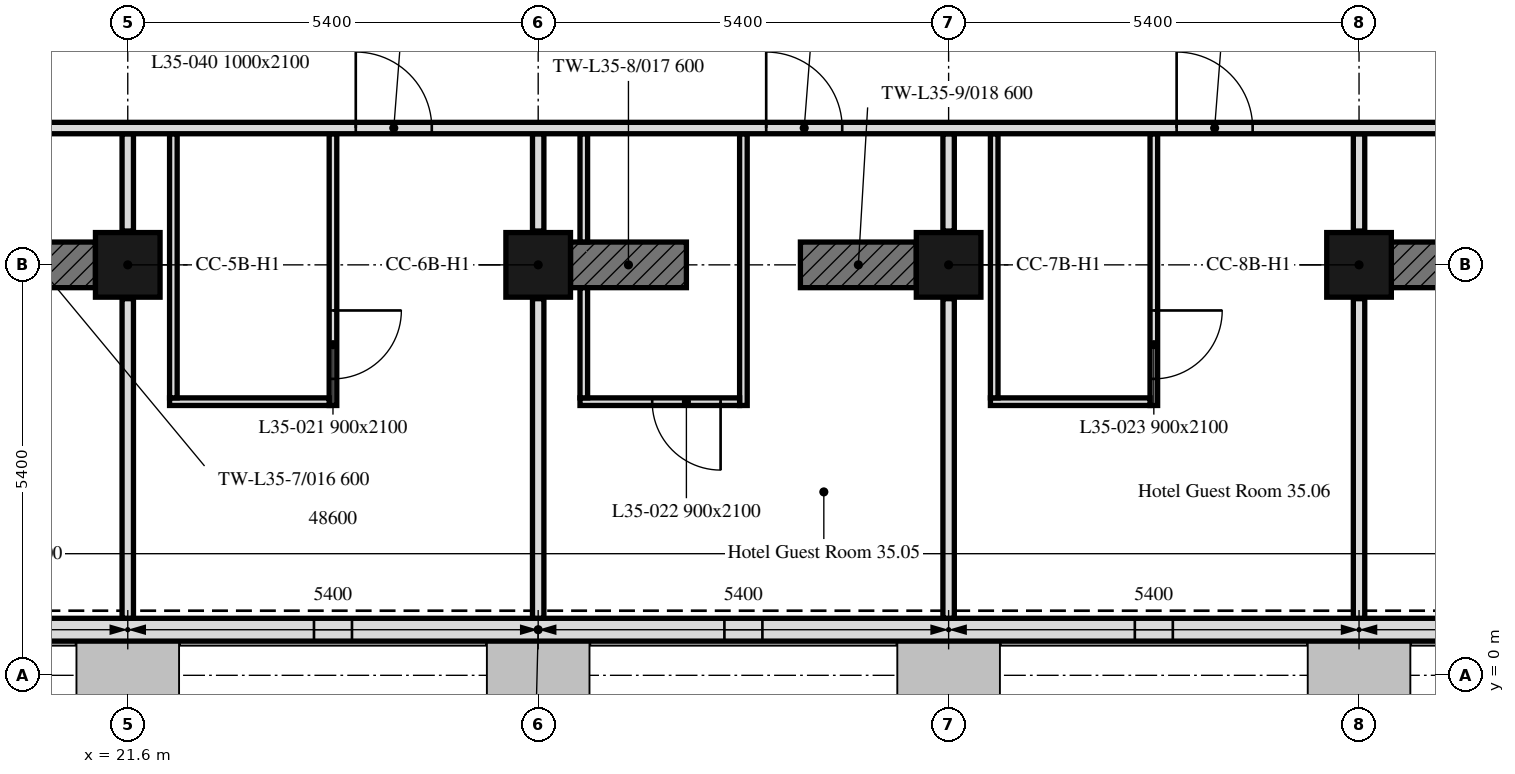
"""IFC4 building model, lengths in metres.
Left out: names, types, materials, properties, quantities, classifications, styles, units other than length and angle.
Written with IfcOpenShell. Run it as: python <this file> out.ifc"""

import sys

from ifc_helpers import new_model, si_unit, direction, frame, frame_2d, origin, origin_2d, place, context, subcontext, project, spatial, rectangle, extrude, element, fill, save


model = new_model("IFC4")
c1 = context("Model", 3, precision=1e-05, world=origin(), true_north=direction((0.0, 1.0)))
c2 = subcontext(c1, "Body", "Model", "MODEL_VIEW")
j1 = project(units=[si_unit("LENGTHUNIT", "METRE"), si_unit("PLANEANGLEUNIT", "RADIAN")], contexts=[c1])
p1 = place(None, origin())
s1 = spatial("IfcSite", under=j1, at=p1, CompositionType="ELEMENT")
p2 = place(p1, origin())
s2 = spatial("IfcBuilding", under=s1, at=p2, CompositionType="ELEMENT")
p3 = place(p2, frame((0.0, 0.0, 152.8)))
s3 = spatial("IfcBuildingStorey", under=s2, at=p3, CompositionType="ELEMENT", Elevation=152.8)
for number, where, z_axis, x_axis in (
    (1, (21.6, 5.4, 0.0), (0.0, 0.0, 1.0), (1.0, 0.0, 0.0)),
    (2, (27.0, 5.4, 0.0), (0.0, 0.0, 1.0), (1.0, 0.0, 0.0)),
    (3, (32.4, 5.4, 0.0), (0.0, 0.0, 1.0), (1.0, 0.0, 0.0)),
    (4, (37.8, 5.4, 0.0), (0.0, 0.0, 1.0), (1.0, 0.0, 0.0)),
):
    element("IfcColumn", number, at=place(p3, frame(where, z_axis=z_axis, x_axis=x_axis)), inside=s3, PredefinedType="COLUMN", context=c2, shape_type="SweptSolid", body=[
        extrude(rectangle(XDim=0.85, YDim=0.85, at=origin_2d()), origin(), (0.0, 0.0, 1.0), 3.0),
    ])
p4 = place(p3, frame((19.65, 5.4, 0.0), z_axis=(0.0, 0.0, 1.0), x_axis=(1.0, 0.0, 0.0)))
e5 = element("IfcWall", 5, at=p4, inside=s3, PredefinedType="SHEAR", context=c2, shape_type="SweptSolid", body=[
    extrude(rectangle(XDim=1.525, YDim=0.6, at=frame_2d((0.763, 0.0))), origin(), (0.0, 0.0, 1.0), 3.0),
])
p5 = place(p3, frame((27.425, 5.4, 0.0), z_axis=(0.0, 0.0, 1.0), x_axis=(1.0, 0.0, 0.0)))
e6 = element("IfcWall", 6, at=p5, inside=s3, PredefinedType="SHEAR", context=c2, shape_type="SweptSolid", body=[
    extrude(rectangle(XDim=1.525, YDim=0.6, at=frame_2d((0.762, 0.0))), origin(), (0.0, 0.0, 1.0), 3.0),
])
p6 = place(p3, frame((30.45, 5.4, 0.0), z_axis=(0.0, 0.0, 1.0), x_axis=(1.0, 0.0, 0.0)))
e7 = element("IfcWall", 7, at=p6, inside=s3, PredefinedType="SHEAR", context=c2, shape_type="SweptSolid", body=[
    extrude(rectangle(XDim=1.525, YDim=0.6, at=frame_2d((0.763, 0.0))), origin(), (0.0, 0.0, 1.0), 3.0),
])
p7 = place(p3, frame((38.225, 5.4, 0.0), z_axis=(0.0, 0.0, 1.0), x_axis=(1.0, 0.0, 0.0)))
e8 = element("IfcWall", 8, at=p7, inside=s3, PredefinedType="SHEAR", context=c2, shape_type="SweptSolid", body=[
    extrude(rectangle(XDim=1.737, YDim=0.6, at=frame_2d((0.869, 0.0))), origin(), (0.0, 0.0, 1.0), 3.0),
])
p8 = place(p3, frame((10.986, 0.6, 0.0), z_axis=(0.0, 0.0, 1.0), x_axis=(1.0, 0.0, 0.0)))
e9 = element("IfcWall", 9, at=p8, inside=s3, PredefinedType="SOLIDWALL", context=c2, shape_type="SweptSolid", body=[
    extrude(rectangle(XDim=32.027, YDim=0.3, at=frame_2d((16.014, 0.0))), origin(), (0.0, 0.0, 1.0), 3.0),
])
p9 = place(p8, frame((0.814, 0.0, 0.9)))
e10 = element("IfcOpeningElement", 10, at=p9, cuts=e9, PredefinedType="OPENING", context=c2, shape_type="SweptSolid", body=[
    extrude(rectangle(XDim=3.4, YDim=1.7, at=frame_2d((1.7, 0.85))), frame((0.0, 0.16, 0.0), z_axis=(0.0, -1.0, 0.0), x_axis=(1.0, 0.0, 0.0)), (0.0, 0.0, 1.0), 0.32),
])
p10 = place(p8, frame((7.664, 0.0, 0.9)))
e11 = element("IfcOpeningElement", 11, at=p10, cuts=e9, PredefinedType="OPENING", context=c2, shape_type="SweptSolid", body=[
    extrude(rectangle(XDim=0.5, YDim=1.7, at=frame_2d((0.25, 0.85))), frame((0.0, 0.16, 0.0), z_axis=(0.0, -1.0, 0.0), x_axis=(1.0, 0.0, 0.0)), (0.0, 0.0, 1.0), 0.32),
])
p11 = place(p8, frame((13.064, 0.0, 0.9)))
e12 = element("IfcOpeningElement", 12, at=p11, cuts=e9, PredefinedType="OPENING", context=c2, shape_type="SweptSolid", body=[
    extrude(rectangle(XDim=0.5, YDim=1.7, at=frame_2d((0.25, 0.85))), frame((0.0, 0.16, 0.0), z_axis=(0.0, -1.0, 0.0), x_axis=(1.0, 0.0, 0.0)), (0.0, 0.0, 1.0), 0.32),
])
p12 = place(p8, frame((18.464, 0.0, 0.9)))
e13 = element("IfcOpeningElement", 13, at=p12, cuts=e9, PredefinedType="OPENING", context=c2, shape_type="SweptSolid", body=[
    extrude(rectangle(XDim=0.5, YDim=1.7, at=frame_2d((0.25, 0.85))), frame((0.0, 0.16, 0.0), z_axis=(0.0, -1.0, 0.0), x_axis=(1.0, 0.0, 0.0)), (0.0, 0.0, 1.0), 0.32),
])
p13 = place(p8, frame((23.864, 0.0, 0.9)))
e14 = element("IfcOpeningElement", 14, at=p13, cuts=e9, PredefinedType="OPENING", context=c2, shape_type="SweptSolid", body=[
    extrude(rectangle(XDim=0.5, YDim=1.7, at=frame_2d((0.25, 0.85))), frame((0.0, 0.16, 0.0), z_axis=(0.0, -1.0, 0.0), x_axis=(1.0, 0.0, 0.0)), (0.0, 0.0, 1.0), 0.32),
])
p14 = place(p8, frame((28.164, 0.0, 0.9)))
e15 = element("IfcOpeningElement", 15, at=p14, cuts=e9, PredefinedType="OPENING", context=c2, shape_type="SweptSolid", body=[
    extrude(rectangle(XDim=1.1, YDim=1.7, at=frame_2d((0.55, 0.85))), frame((0.0, 0.16, 0.0), z_axis=(0.0, -1.0, 0.0), x_axis=(1.0, 0.0, 0.0)), (0.0, 0.0, 1.0), 0.32),
])
p15 = place(p3, frame((21.6, 0.751, 0.0), z_axis=(0.0, 0.0, 1.0), x_axis=(0.0, 1.0, 0.0)))
e16 = element("IfcWall", 16, at=p15, inside=s3, PredefinedType="PARTITIONING", context=c2, shape_type="SweptSolid", body=[
    extrude(rectangle(XDim=4.204, YDim=0.15, at=frame_2d((2.102, 0.0))), origin(), (0.0, 0.0, 1.0), 2.4),
])
p16 = place(p3, frame((21.6, 5.845, 0.0), z_axis=(0.0, 0.0, 1.0), x_axis=(0.0, 1.0, 0.0)))
e17 = element("IfcWall", 17, at=p16, inside=s3, PredefinedType="PARTITIONING", context=c2, shape_type="SweptSolid", body=[
    extrude(rectangle(XDim=1.28, YDim=0.15, at=frame_2d((0.64, 0.0))), origin(), (0.0, 0.0, 1.0), 2.4),
])
p17 = place(p3, frame((27.0, 0.751, 0.0), z_axis=(0.0, 0.0, 1.0), x_axis=(0.0, 1.0, 0.0)))
e18 = element("IfcWall", 18, at=p17, inside=s3, PredefinedType="PARTITIONING", context=c2, shape_type="SweptSolid", body=[
    extrude(rectangle(XDim=4.204, YDim=0.15, at=frame_2d((2.102, 0.0))), origin(), (0.0, 0.0, 1.0), 2.4),
])
p18 = place(p3, frame((27.0, 5.845, 0.0), z_axis=(0.0, 0.0, 1.0), x_axis=(0.0, 1.0, 0.0)))
e19 = element("IfcWall", 19, at=p18, inside=s3, PredefinedType="PARTITIONING", context=c2, shape_type="SweptSolid", body=[
    extrude(rectangle(XDim=1.28, YDim=0.15, at=frame_2d((0.64, 0.0))), origin(), (0.0, 0.0, 1.0), 2.4),
])
p19 = place(p3, frame((24.3, 7.125, 0.0), z_axis=(0.0, 0.0, 1.0), x_axis=(0.0, -1.0, 0.0)))
e20 = element("IfcWall", 20, at=p19, inside=s3, PredefinedType="PARTITIONING", context=c2, shape_type="SweptSolid", body=[
    extrude(rectangle(XDim=3.575, YDim=0.1, at=frame_2d((1.788, 0.0))), origin(), (0.0, 0.0, 1.0), 3.0),
])
p20 = place(p19, frame((2.325, 0.0, 0.0)))
e21 = element("IfcOpeningElement", 21, at=p20, cuts=e20, PredefinedType="OPENING", context=c2, shape_type="SweptSolid", body=[
    extrude(rectangle(XDim=0.9, YDim=2.1, at=frame_2d((0.45, 1.05))), frame((0.0, 0.05, 0.0), z_axis=(0.0, -1.0, 0.0), x_axis=(1.0, 0.0, 0.0)), (0.0, 0.0, 1.0), 0.1),
])
p21 = place(p3, frame((24.25, 3.6, 0.0), z_axis=(0.0, 0.0, 1.0), x_axis=(-1.0, 0.0, 0.0)))
e22 = element("IfcWall", 22, at=p21, inside=s3, PredefinedType="PARTITIONING", context=c2, shape_type="SweptSolid", body=[
    extrude(rectangle(XDim=2.1, YDim=0.1, at=frame_2d((1.05, 0.0))), origin(), (0.0, 0.0, 1.0), 3.0),
])
p22 = place(p3, frame((22.2, 3.65, 0.0), z_axis=(0.0, 0.0, 1.0), x_axis=(0.0, 1.0, 0.0)))
e23 = element("IfcWall", 23, at=p22, inside=s3, PredefinedType="PARTITIONING", context=c2, shape_type="SweptSolid", body=[
    extrude(rectangle(XDim=3.475, YDim=0.1, at=frame_2d((1.738, 0.0))), origin(), (0.0, 0.0, 1.0), 3.0),
])
p23 = place(p3, frame((32.4, 0.751, 0.0), z_axis=(0.0, 0.0, 1.0), x_axis=(0.0, 1.0, 0.0)))
e24 = element("IfcWall", 24, at=p23, inside=s3, PredefinedType="PARTITIONING", context=c2, shape_type="SweptSolid", body=[
    extrude(rectangle(XDim=4.204, YDim=0.15, at=frame_2d((2.102, 0.0))), origin(), (0.0, 0.0, 1.0), 2.4),
])
p24 = place(p3, frame((32.4, 5.845, 0.0), z_axis=(0.0, 0.0, 1.0), x_axis=(0.0, 1.0, 0.0)))
e25 = element("IfcWall", 25, at=p24, inside=s3, PredefinedType="PARTITIONING", context=c2, shape_type="SweptSolid", body=[
    extrude(rectangle(XDim=1.28, YDim=0.15, at=frame_2d((0.64, 0.0))), origin(), (0.0, 0.0, 1.0), 2.4),
])
p25 = place(p3, frame((29.7, 7.125, 0.0), z_axis=(0.0, 0.0, 1.0), x_axis=(0.0, -1.0, 0.0)))
e26 = element("IfcWall", 26, at=p25, inside=s3, PredefinedType="PARTITIONING", context=c2, shape_type="SweptSolid", body=[
    extrude(rectangle(XDim=3.575, YDim=0.1, at=frame_2d((1.788, 0.0))), origin(), (0.0, 0.0, 1.0), 3.0),
])
p26 = place(p3, frame((29.65, 3.6, 0.0), z_axis=(0.0, 0.0, 1.0), x_axis=(-1.0, 0.0, 0.0)))
e27 = element("IfcWall", 27, at=p26, inside=s3, PredefinedType="PARTITIONING", context=c2, shape_type="SweptSolid", body=[
    extrude(rectangle(XDim=2.1, YDim=0.1, at=frame_2d((1.05, 0.0))), origin(), (0.0, 0.0, 1.0), 3.0),
])
p27 = place(p26, frame((0.25, 0.0, 0.0)))
e28 = element("IfcOpeningElement", 28, at=p27, cuts=e27, PredefinedType="OPENING", context=c2, shape_type="SweptSolid", body=[
    extrude(rectangle(XDim=0.9, YDim=2.1, at=frame_2d((0.45, 1.05))), frame((0.0, 0.05, 0.0), z_axis=(0.0, -1.0, 0.0), x_axis=(1.0, 0.0, 0.0)), (0.0, 0.0, 1.0), 0.1),
])
p28 = place(p3, frame((27.6, 3.65, 0.0), z_axis=(0.0, 0.0, 1.0), x_axis=(0.0, 1.0, 0.0)))
e29 = element("IfcWall", 29, at=p28, inside=s3, PredefinedType="PARTITIONING", context=c2, shape_type="SweptSolid", body=[
    extrude(rectangle(XDim=1.449, YDim=0.1, at=frame_2d((0.725, 0.0))), origin(), (0.0, 0.0, 1.0), 3.0),
])
p29 = place(p3, frame((27.6, 5.701, 0.0), z_axis=(0.0, 0.0, 1.0), x_axis=(0.0, 1.0, 0.0)))
e30 = element("IfcWall", 30, at=p29, inside=s3, PredefinedType="PARTITIONING", context=c2, shape_type="SweptSolid", body=[
    extrude(rectangle(XDim=1.424, YDim=0.1, at=frame_2d((0.712, 0.0))), origin(), (0.0, 0.0, 1.0), 3.0),
])
p30 = place(p3, frame((37.8, 0.751, 0.0), z_axis=(0.0, 0.0, 1.0), x_axis=(0.0, 1.0, 0.0)))
e31 = element("IfcWall", 31, at=p30, inside=s3, PredefinedType="PARTITIONING", context=c2, shape_type="SweptSolid", body=[
    extrude(rectangle(XDim=4.204, YDim=0.15, at=frame_2d((2.102, 0.0))), origin(), (0.0, 0.0, 1.0), 2.4),
])
p31 = place(p3, frame((37.8, 5.845, 0.0), z_axis=(0.0, 0.0, 1.0), x_axis=(0.0, 1.0, 0.0)))
e32 = element("IfcWall", 32, at=p31, inside=s3, PredefinedType="PARTITIONING", context=c2, shape_type="SweptSolid", body=[
    extrude(rectangle(XDim=1.28, YDim=0.15, at=frame_2d((0.64, 0.0))), origin(), (0.0, 0.0, 1.0), 2.4),
])
p32 = place(p3, frame((35.1, 7.125, 0.0), z_axis=(0.0, 0.0, 1.0), x_axis=(0.0, -1.0, 0.0)))
e33 = element("IfcWall", 33, at=p32, inside=s3, PredefinedType="PARTITIONING", context=c2, shape_type="SweptSolid", body=[
    extrude(rectangle(XDim=3.575, YDim=0.1, at=frame_2d((1.788, 0.0))), origin(), (0.0, 0.0, 1.0), 3.0),
])
p33 = place(p32, frame((2.325, 0.0, 0.0)))
e34 = element("IfcOpeningElement", 34, at=p33, cuts=e33, PredefinedType="OPENING", context=c2, shape_type="SweptSolid", body=[
    extrude(rectangle(XDim=0.9, YDim=2.1, at=frame_2d((0.45, 1.05))), frame((0.0, 0.05, 0.0), z_axis=(0.0, -1.0, 0.0), x_axis=(1.0, 0.0, 0.0)), (0.0, 0.0, 1.0), 0.1),
])
p34 = place(p3, frame((35.05, 3.6, 0.0), z_axis=(0.0, 0.0, 1.0), x_axis=(-1.0, 0.0, 0.0)))
e35 = element("IfcWall", 35, at=p34, inside=s3, PredefinedType="PARTITIONING", context=c2, shape_type="SweptSolid", body=[
    extrude(rectangle(XDim=2.1, YDim=0.1, at=frame_2d((1.05, 0.0))), origin(), (0.0, 0.0, 1.0), 3.0),
])
p35 = place(p3, frame((33.0, 3.65, 0.0), z_axis=(0.0, 0.0, 1.0), x_axis=(0.0, 1.0, 0.0)))
e36 = element("IfcWall", 36, at=p35, inside=s3, PredefinedType="PARTITIONING", context=c2, shape_type="SweptSolid", body=[
    extrude(rectangle(XDim=3.475, YDim=0.1, at=frame_2d((1.738, 0.0))), origin(), (0.0, 0.0, 1.0), 3.0),
])
p36 = place(p3, frame((6.151, 7.2, 0.0), z_axis=(0.0, 0.0, 1.0), x_axis=(1.0, 0.0, 0.0)))
e37 = element("IfcWall", 37, at=p36, inside=s3, PredefinedType="PARTITIONING", context=c2, shape_type="SweptSolid", body=[
    extrude(rectangle(XDim=41.698, YDim=0.15, at=frame_2d((20.849, 0.0))), origin(), (0.0, 0.0, 1.0), 2.4),
])
p37 = place(p36, frame((2.249, 0.0, 0.0)))
e38 = element("IfcOpeningElement", 38, at=p37, cuts=e37, PredefinedType="OPENING", context=c2, shape_type="SweptSolid", body=[
    extrude(rectangle(XDim=1.0, YDim=2.1, at=frame_2d((0.5, 1.05))), frame((0.0, 0.075, 0.0), z_axis=(0.0, -1.0, 0.0), x_axis=(1.0, 0.0, 0.0)), (0.0, 0.0, 1.0), 0.15),
])
p38 = place(p36, frame((7.649, 0.0, 0.0)))
e39 = element("IfcOpeningElement", 39, at=p38, cuts=e37, PredefinedType="OPENING", context=c2, shape_type="SweptSolid", body=[
    extrude(rectangle(XDim=1.0, YDim=2.1, at=frame_2d((0.5, 1.05))), frame((0.0, 0.075, 0.0), z_axis=(0.0, -1.0, 0.0), x_axis=(1.0, 0.0, 0.0)), (0.0, 0.0, 1.0), 0.15),
])
p39 = place(p36, frame((13.049, 0.0, 0.0)))
e40 = element("IfcOpeningElement", 40, at=p39, cuts=e37, PredefinedType="OPENING", context=c2, shape_type="SweptSolid", body=[
    extrude(rectangle(XDim=1.0, YDim=2.1, at=frame_2d((0.5, 1.05))), frame((0.0, 0.075, 0.0), z_axis=(0.0, -1.0, 0.0), x_axis=(1.0, 0.0, 0.0)), (0.0, 0.0, 1.0), 0.15),
])
p40 = place(p36, frame((18.449, 0.0, 0.0)))
e41 = element("IfcOpeningElement", 41, at=p40, cuts=e37, PredefinedType="OPENING", context=c2, shape_type="SweptSolid", body=[
    extrude(rectangle(XDim=1.0, YDim=2.1, at=frame_2d((0.5, 1.05))), frame((0.0, 0.075, 0.0), z_axis=(0.0, -1.0, 0.0), x_axis=(1.0, 0.0, 0.0)), (0.0, 0.0, 1.0), 0.15),
])
p41 = place(p36, frame((23.849, 0.0, 0.0)))
e42 = element("IfcOpeningElement", 42, at=p41, cuts=e37, PredefinedType="OPENING", context=c2, shape_type="SweptSolid", body=[
    extrude(rectangle(XDim=1.0, YDim=2.1, at=frame_2d((0.5, 1.05))), frame((0.0, 0.075, 0.0), z_axis=(0.0, -1.0, 0.0), x_axis=(1.0, 0.0, 0.0)), (0.0, 0.0, 1.0), 0.15),
])
p42 = place(p36, frame((29.249, 0.0, 0.0)))
e43 = element("IfcOpeningElement", 43, at=p42, cuts=e37, PredefinedType="OPENING", context=c2, shape_type="SweptSolid", body=[
    extrude(rectangle(XDim=1.0, YDim=2.1, at=frame_2d((0.5, 1.05))), frame((0.0, 0.075, 0.0), z_axis=(0.0, -1.0, 0.0), x_axis=(1.0, 0.0, 0.0)), (0.0, 0.0, 1.0), 0.15),
])
p43 = place(p36, frame((37.954, 0.0, 0.0)))
e44 = element("IfcOpeningElement", 44, at=p43, cuts=e37, PredefinedType="OPENING", context=c2, shape_type="SweptSolid", body=[
    extrude(rectangle(XDim=1.0, YDim=2.1, at=frame_2d((0.5, 1.05))), frame((0.0, 0.075, 0.0), z_axis=(0.0, -1.0, 0.0), x_axis=(1.0, 0.0, 0.0)), (0.0, 0.0, 1.0), 0.15),
])
p44 = place(p11, origin())
e45 = element("IfcWindow", 45, at=p44, inside=s3, PartitioningType="SINGLE_PANEL", PredefinedType="WINDOW", context=c2, shape_type="SweptSolid", body=[
    extrude(rectangle(XDim=0.5, YDim=1.7, at=frame_2d((0.25, 0.85))), frame((0.0, 0.03, 0.0), z_axis=(0.0, -1.0, 0.0), x_axis=(1.0, 0.0, 0.0)), (0.0, 0.0, 1.0), 0.06),
])
fill(e12, e45)
p45 = place(p12, origin())
e46 = element("IfcWindow", 46, at=p45, inside=s3, PartitioningType="SINGLE_PANEL", PredefinedType="WINDOW", context=c2, shape_type="SweptSolid", body=[
    extrude(rectangle(XDim=0.5, YDim=1.7, at=frame_2d((0.25, 0.85))), frame((0.0, 0.03, 0.0), z_axis=(0.0, -1.0, 0.0), x_axis=(1.0, 0.0, 0.0)), (0.0, 0.0, 1.0), 0.06),
])
fill(e13, e46)
p46 = place(p13, origin())
e47 = element("IfcWindow", 47, at=p46, inside=s3, PartitioningType="SINGLE_PANEL", PredefinedType="WINDOW", context=c2, shape_type="SweptSolid", body=[
    extrude(rectangle(XDim=0.5, YDim=1.7, at=frame_2d((0.25, 0.85))), frame((0.0, 0.03, 0.0), z_axis=(0.0, -1.0, 0.0), x_axis=(1.0, 0.0, 0.0)), (0.0, 0.0, 1.0), 0.06),
])
fill(e14, e47)
p47 = place(p20, origin())
e48 = element("IfcDoor", 48, at=p47, inside=s3, OperationType="SINGLE_SWING_RIGHT", PredefinedType="DOOR", context=c2, shape_type="SweptSolid", body=[
    extrude(rectangle(XDim=0.9, YDim=2.1, at=frame_2d((0.45, 1.05))), frame((0.0, 0.025, 0.0), z_axis=(0.0, -1.0, 0.0), x_axis=(1.0, 0.0, 0.0)), (0.0, 0.0, 1.0), 0.05),
])
fill(e21, e48)
p48 = place(p27, origin())
e49 = element("IfcDoor", 49, at=p48, inside=s3, OperationType="SINGLE_SWING_LEFT", PredefinedType="DOOR", context=c2, shape_type="SweptSolid", body=[
    extrude(rectangle(XDim=0.9, YDim=2.1, at=frame_2d((0.45, 1.05))), frame((0.0, 0.025, 0.0), z_axis=(0.0, -1.0, 0.0), x_axis=(1.0, 0.0, 0.0)), (0.0, 0.0, 1.0), 0.05),
])
fill(e28, e49)
p49 = place(p33, origin())
e50 = element("IfcDoor", 50, at=p49, inside=s3, OperationType="SINGLE_SWING_LEFT", PredefinedType="DOOR", context=c2, shape_type="SweptSolid", body=[
    extrude(rectangle(XDim=0.9, YDim=2.1, at=frame_2d((0.45, 1.05))), frame((0.0, 0.025, 0.0), z_axis=(0.0, -1.0, 0.0), x_axis=(1.0, 0.0, 0.0)), (0.0, 0.0, 1.0), 0.05),
])
fill(e34, e50)
p50 = place(p40, origin())
e51 = element("IfcDoor", 51, at=p50, inside=s3, OperationType="SINGLE_SWING_LEFT", PredefinedType="DOOR", context=c2, shape_type="SweptSolid", body=[
    extrude(rectangle(XDim=1.0, YDim=2.1, at=frame_2d((0.5, 1.05))), frame((0.0, 0.025, 0.0), z_axis=(0.0, -1.0, 0.0), x_axis=(1.0, 0.0, 0.0)), (0.0, 0.0, 1.0), 0.05),
])
fill(e41, e51)
p51 = place(p41, origin())
e52 = element("IfcDoor", 52, at=p51, inside=s3, OperationType="SINGLE_SWING_LEFT", PredefinedType="DOOR", context=c2, shape_type="SweptSolid", body=[
    extrude(rectangle(XDim=1.0, YDim=2.1, at=frame_2d((0.5, 1.05))), frame((0.0, 0.025, 0.0), z_axis=(0.0, -1.0, 0.0), x_axis=(1.0, 0.0, 0.0)), (0.0, 0.0, 1.0), 0.05),
])
fill(e42, e52)
p52 = place(p42, origin())
e53 = element("IfcDoor", 53, at=p52, inside=s3, OperationType="SINGLE_SWING_RIGHT", PredefinedType="DOOR", context=c2, shape_type="SweptSolid", body=[
    extrude(rectangle(XDim=1.0, YDim=2.1, at=frame_2d((0.5, 1.05))), frame((0.0, 0.025, 0.0), z_axis=(0.0, -1.0, 0.0), x_axis=(1.0, 0.0, 0.0)), (0.0, 0.0, 1.0), 0.05),
])
fill(e43, e53)
save(model, sys.argv[1])
